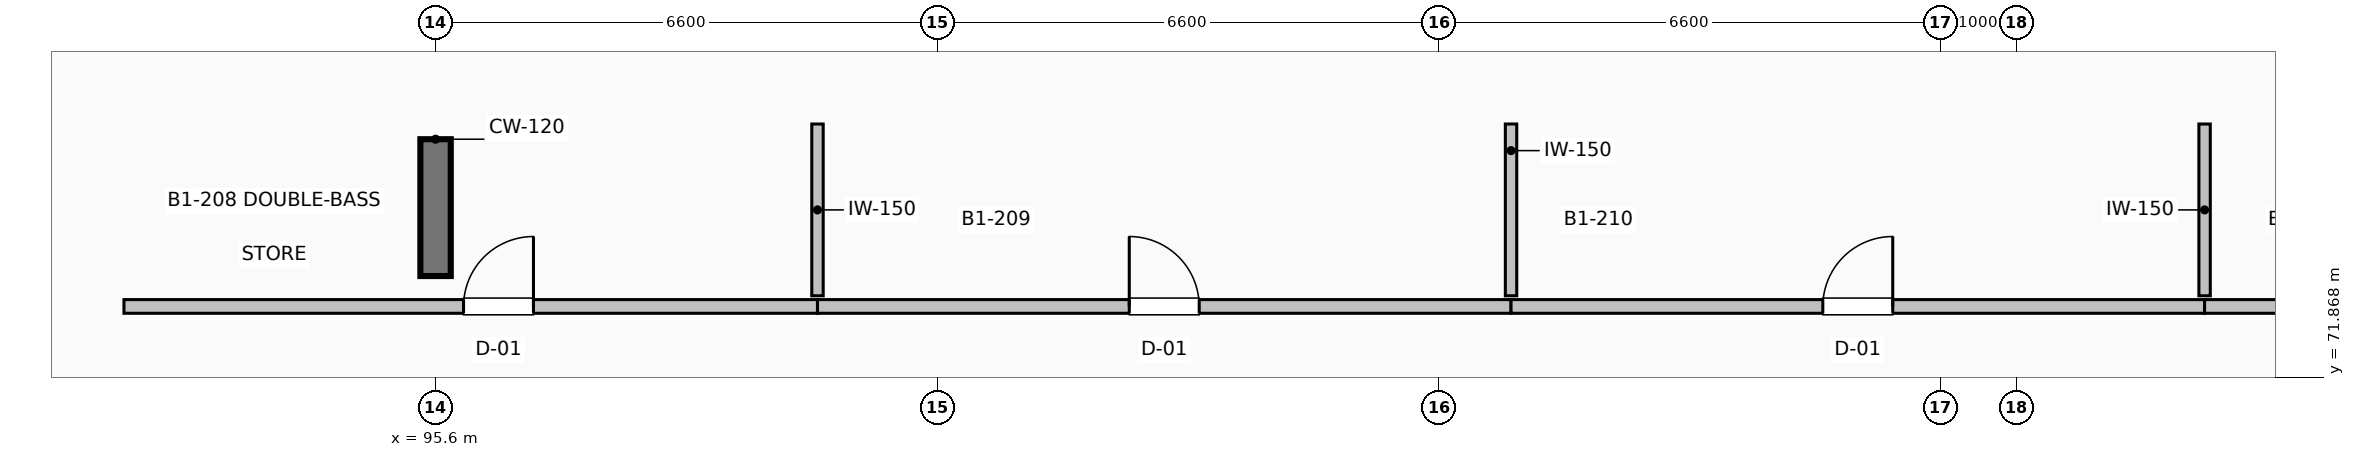
"""IFC4 building model, lengths in metres.
Left out: names, types, materials, properties, quantities, classifications, styles, units other than length and angle.
Written with IfcOpenShell. Run it as: python <this file> out.ifc"""

import sys

from ifc_helpers import new_model, si_unit, direction, frame, frame_2d, origin, place, context, subcontext, project, spatial, rectangle, extrude, element, fill, save


model = new_model("IFC4")
c1 = context("Model", 3, precision=1e-05, world=origin(), true_north=direction((0.0, 1.0)))
c2 = subcontext(c1, "Body", "Model", "MODEL_VIEW")
j1 = project(units=[si_unit("LENGTHUNIT", "METRE"), si_unit("PLANEANGLEUNIT", "RADIAN")], contexts=[c1])
p1 = place(None, origin())
s1 = spatial("IfcSite", under=j1, at=p1, CompositionType="ELEMENT")
p2 = place(p1, origin())
s2 = spatial("IfcBuilding", under=s1, at=p2, CompositionType="ELEMENT")
p3 = place(p2, frame((0.0, 0.0, -4.8)))
s3 = spatial("IfcBuildingStorey", under=s2, at=p3, CompositionType="ELEMENT", Elevation=-4.8)
p4 = place(p3, frame((95.6, 73.2, 0.0), z_axis=(0.0, 0.0, 1.0), x_axis=(0.0, 1.0, 0.0)))
e1 = element("IfcWall", 1, at=p4, inside=s3, PredefinedType="SHEAR", context=c2, shape_type="SweptSolid", body=[
    extrude(rectangle(XDim=1.8, YDim=0.4, at=frame_2d((0.9, 0.0))), origin(), (0.0, 0.0, 1.0), 4.48),
])
p5 = place(p3, frame((91.5, 72.8, 0.0), z_axis=(0.0, 0.0, 1.0), x_axis=(1.0, 0.0, 0.0)))
e2 = element("IfcWall", 2, at=p5, inside=s3, PredefinedType="PARTITIONING", context=c2, shape_type="SweptSolid", body=[
    extrude(rectangle(XDim=9.125, YDim=0.18, at=frame_2d((4.562, 0.0))), origin(), (0.0, 0.0, 1.0), 4.472),
])
p6 = place(p5, frame((4.468, 0.0, 0.0)))
e3 = element("IfcOpeningElement", 3, at=p6, cuts=e2, PredefinedType="OPENING", context=c2, shape_type="SweptSolid", body=[
    extrude(rectangle(XDim=0.92, YDim=2.05, at=frame_2d((0.46, 1.025))), frame((0.0, 0.1, 0.0), z_axis=(0.0, -1.0, 0.0), x_axis=(1.0, 0.0, 0.0)), (0.0, 0.0, 1.0), 0.2),
])
p7 = place(p3, frame((100.625, 72.94, 0.0), z_axis=(0.0, 0.0, 1.0), x_axis=(0.0, 1.0, 0.0)))
e4 = element("IfcWall", 4, at=p7, inside=s3, PredefinedType="PARTITIONING", context=c2, shape_type="SweptSolid", body=[
    extrude(rectangle(XDim=2.26, YDim=0.15, at=frame_2d((1.13, 0.0))), origin(), (0.0, 0.0, 1.0), 4.472),
])
p8 = place(p3, frame((100.625, 72.8, 0.0), z_axis=(0.0, 0.0, 1.0), x_axis=(1.0, 0.0, 0.0)))
e5 = element("IfcWall", 5, at=p8, inside=s3, PredefinedType="PARTITIONING", context=c2, shape_type="SweptSolid", body=[
    extrude(rectangle(XDim=9.125, YDim=0.18, at=frame_2d((4.562, 0.0))), origin(), (0.0, 0.0, 1.0), 4.472),
])
p9 = place(p8, frame((4.102, 0.0, 0.0)))
e6 = element("IfcOpeningElement", 6, at=p9, cuts=e5, PredefinedType="OPENING", context=c2, shape_type="SweptSolid", body=[
    extrude(rectangle(XDim=0.92, YDim=2.05, at=frame_2d((0.46, 1.025))), frame((0.0, 0.1, 0.0), z_axis=(0.0, -1.0, 0.0), x_axis=(1.0, 0.0, 0.0)), (0.0, 0.0, 1.0), 0.2),
])
p10 = place(p3, frame((109.75, 72.94, 0.0), z_axis=(0.0, 0.0, 1.0), x_axis=(0.0, 1.0, 0.0)))
e7 = element("IfcWall", 7, at=p10, inside=s3, PredefinedType="PARTITIONING", context=c2, shape_type="SweptSolid", body=[
    extrude(rectangle(XDim=2.26, YDim=0.15, at=frame_2d((1.13, 0.0))), origin(), (0.0, 0.0, 1.0), 4.472),
])
p11 = place(p3, frame((109.75, 72.8, 0.0), z_axis=(0.0, 0.0, 1.0), x_axis=(1.0, 0.0, 0.0)))
e8 = element("IfcWall", 8, at=p11, inside=s3, PredefinedType="PARTITIONING", context=c2, shape_type="SweptSolid", body=[
    extrude(rectangle(XDim=9.125, YDim=0.18, at=frame_2d((4.562, 0.0))), origin(), (0.0, 0.0, 1.0), 4.472),
])
p12 = place(p11, frame((4.102, 0.0, 0.0)))
e9 = element("IfcOpeningElement", 9, at=p12, cuts=e8, PredefinedType="OPENING", context=c2, shape_type="SweptSolid", body=[
    extrude(rectangle(XDim=0.92, YDim=2.05, at=frame_2d((0.46, 1.025))), frame((0.0, 0.1, 0.0), z_axis=(0.0, -1.0, 0.0), x_axis=(1.0, 0.0, 0.0)), (0.0, 0.0, 1.0), 0.2),
])
p13 = place(p3, frame((118.875, 72.94, 0.0), z_axis=(0.0, 0.0, 1.0), x_axis=(0.0, 1.0, 0.0)))
e10 = element("IfcWall", 10, at=p13, inside=s3, PredefinedType="PARTITIONING", context=c2, shape_type="SweptSolid", body=[
    extrude(rectangle(XDim=2.26, YDim=0.15, at=frame_2d((1.13, 0.0))), origin(), (0.0, 0.0, 1.0), 4.472),
])
p14 = place(p3, frame((118.875, 72.8, 0.0), z_axis=(0.0, 0.0, 1.0), x_axis=(1.0, 0.0, 0.0)))
e11 = element("IfcWall", 11, at=p14, inside=s3, PredefinedType="PARTITIONING", context=c2, shape_type="SweptSolid", body=[
    extrude(rectangle(XDim=9.125, YDim=0.18, at=frame_2d((4.562, 0.0))), origin(), (0.0, 0.0, 1.0), 4.472),
])
p15 = place(p14, frame((4.102, 0.0, 0.0)))
e12 = element("IfcOpeningElement", 12, at=p15, cuts=e11, PredefinedType="OPENING", context=c2, shape_type="SweptSolid", body=[
    extrude(rectangle(XDim=0.92, YDim=2.05, at=frame_2d((0.46, 1.025))), frame((0.0, 0.1, 0.0), z_axis=(0.0, -1.0, 0.0), x_axis=(1.0, 0.0, 0.0)), (0.0, 0.0, 1.0), 0.2),
])
p16 = place(p6, origin())
e13 = element("IfcDoor", 13, at=p16, inside=s3, OperationType="SINGLE_SWING_RIGHT", PredefinedType="DOOR", context=c2, shape_type="SweptSolid", body=[
    extrude(rectangle(XDim=0.92, YDim=2.05, at=frame_2d((0.46, 1.025))), frame((0.0, 0.025, 0.0), z_axis=(0.0, -1.0, 0.0), x_axis=(1.0, 0.0, 0.0)), (0.0, 0.0, 1.0), 0.05),
])
fill(e3, e13)
p17 = place(p9, origin())
e14 = element("IfcDoor", 14, at=p17, inside=s3, OperationType="SINGLE_SWING_LEFT", PredefinedType="DOOR", context=c2, shape_type="SweptSolid", body=[
    extrude(rectangle(XDim=0.92, YDim=2.05, at=frame_2d((0.46, 1.025))), frame((0.0, 0.025, 0.0), z_axis=(0.0, -1.0, 0.0), x_axis=(1.0, 0.0, 0.0)), (0.0, 0.0, 1.0), 0.05),
])
fill(e6, e14)
p18 = place(p12, origin())
e15 = element("IfcDoor", 15, at=p18, inside=s3, OperationType="SINGLE_SWING_RIGHT", PredefinedType="DOOR", context=c2, shape_type="SweptSolid", body=[
    extrude(rectangle(XDim=0.92, YDim=2.05, at=frame_2d((0.46, 1.025))), frame((0.0, 0.025, 0.0), z_axis=(0.0, -1.0, 0.0), x_axis=(1.0, 0.0, 0.0)), (0.0, 0.0, 1.0), 0.05),
])
fill(e9, e15)
save(model, sys.argv[1])
